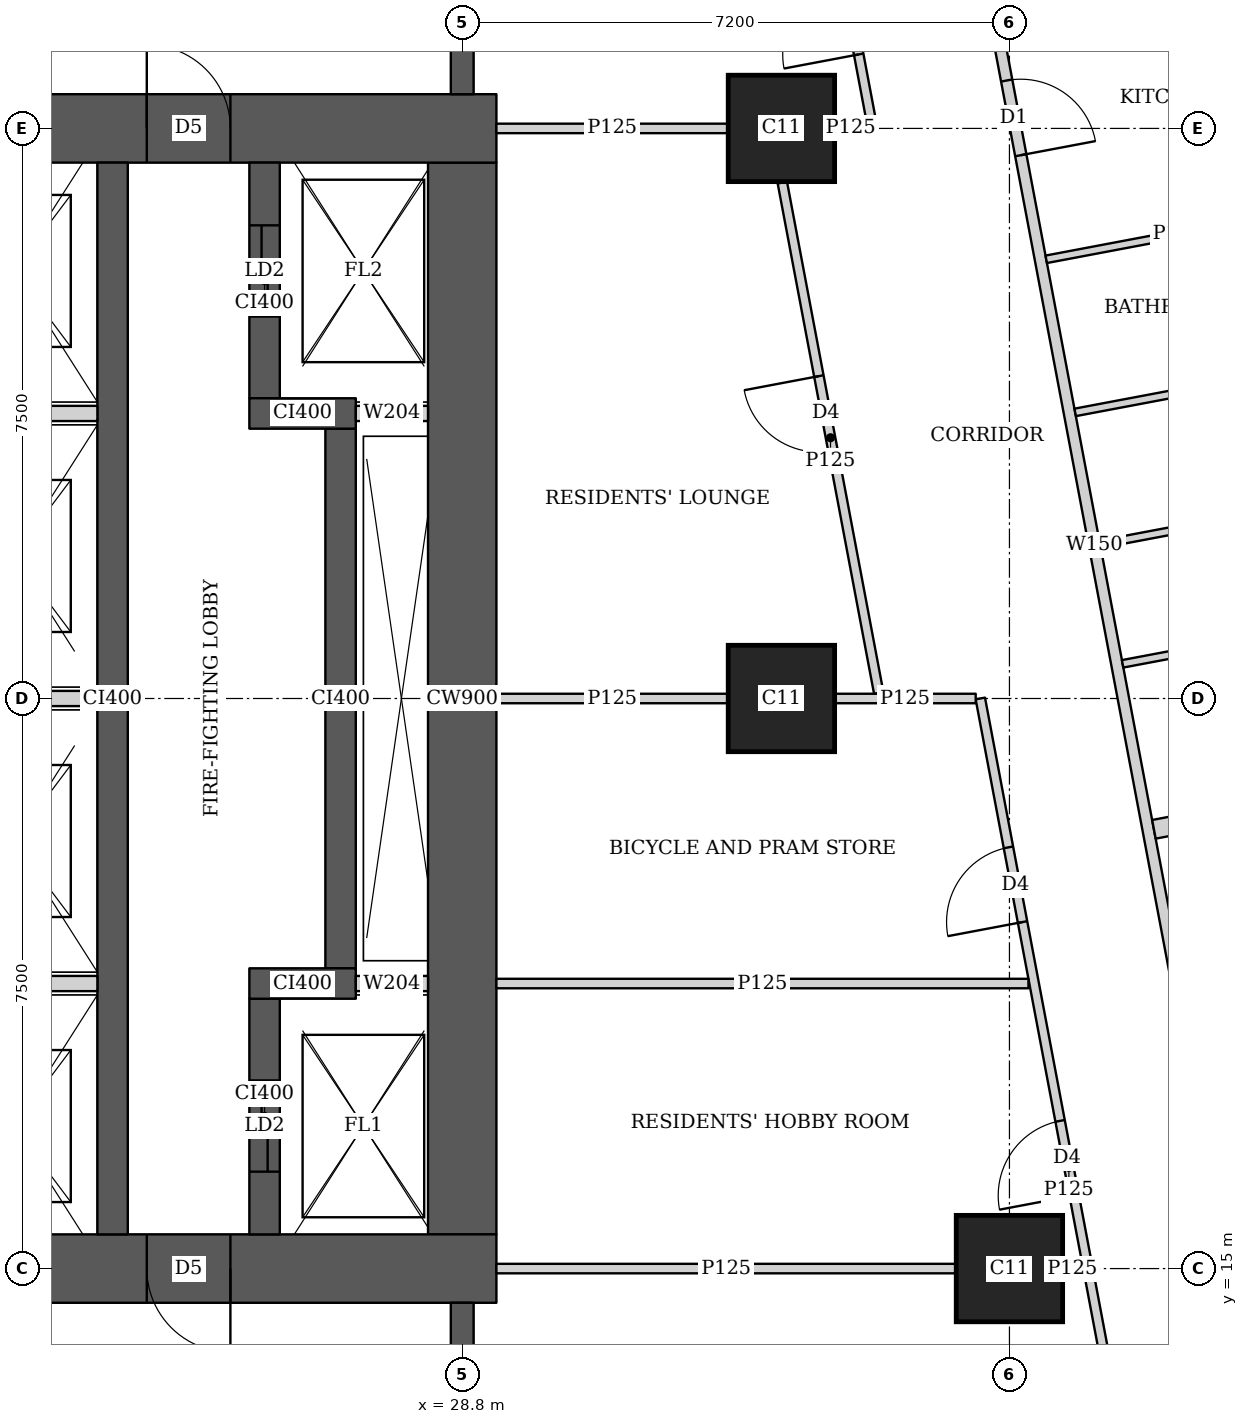
"""IFC4 building model, lengths in metres.
Left out: names, types, materials, properties, quantities, classifications, styles, units other than length and angle.
Written with IfcOpenShell. Run it as: python <this file> out.ifc"""

import sys

from ifc_helpers import new_model, si_unit, direction, frame, frame_2d, origin, origin_2d, place, context, subcontext, project, spatial, rectangle, extrude, element, fill, save


model = new_model("IFC4")
c1 = context("Model", 3, precision=1e-05, world=origin(), true_north=direction((0.0, 1.0)))
c2 = subcontext(c1, "Body", "Model", "MODEL_VIEW")
j1 = project(units=[si_unit("LENGTHUNIT", "METRE"), si_unit("PLANEANGLEUNIT", "RADIAN")], contexts=[c1])
p1 = place(None, origin())
s1 = spatial("IfcSite", under=j1, at=p1, CompositionType="ELEMENT")
p2 = place(p1, origin())
s2 = spatial("IfcBuilding", under=s1, at=p2, CompositionType="ELEMENT")
p3 = place(p2, frame((0.0, 0.0, 251.6)))
s3 = spatial("IfcBuildingStorey", under=s2, at=p3, CompositionType="ELEMENT", Elevation=251.6)
for number, where, z_axis, x_axis in (
    (1, (36.0, 15.0, 0.0), (0.0, 0.0, 1.0), (1.0, 0.0, 0.0)),
    (2, (33.0, 22.5, 0.0), (0.0, 0.0, 1.0), (1.0, 0.0, 0.0)),
    (3, (33.0, 30.0, 0.0), (0.0, 0.0, 1.0), (1.0, 0.0, 0.0)),
):
    element("IfcColumn", number, at=place(p3, frame(where, z_axis=z_axis, x_axis=x_axis)), inside=s3, PredefinedType="COLUMN", context=c2, shape_type="SweptSolid", body=[
        extrude(rectangle(XDim=1.4, YDim=1.4, at=origin_2d()), origin(), (0.0, 0.0, 1.0), 3.75),
    ])
p4 = place(p3, frame((13.95, 15.0, 0.0), z_axis=(0.0, 0.0, 1.0), x_axis=(1.0, 0.0, 0.0)))
e4 = element("IfcWall", 4, at=p4, inside=s3, PredefinedType="SHEAR", context=c2, shape_type="SweptSolid", body=[
    extrude(rectangle(XDim=15.3, YDim=0.9, at=frame_2d((7.65, 0.0))), origin(), (0.0, 0.0, 1.0), 3.75),
])
p5 = place(p4, frame((4.45, 0.0, 0.0)))
e5 = element("IfcOpeningElement", 5, at=p5, cuts=e4, PredefinedType="OPENING", context=c2, shape_type="SweptSolid", body=[
    extrude(rectangle(XDim=1.8, YDim=2.1, at=frame_2d((0.9, 1.05))), frame((0.0, 0.46, 0.0), z_axis=(0.0, -1.0, 0.0), x_axis=(1.0, 0.0, 0.0)), (0.0, 0.0, 1.0), 0.92),
])
p6 = place(p4, frame((10.7, 0.0, 0.0)))
e6 = element("IfcOpeningElement", 6, at=p6, cuts=e4, PredefinedType="OPENING", context=c2, shape_type="SweptSolid", body=[
    extrude(rectangle(XDim=1.1, YDim=2.1, at=frame_2d((0.55, 1.05))), frame((0.0, 0.46, 0.0), z_axis=(0.0, -1.0, 0.0), x_axis=(1.0, 0.0, 0.0)), (0.0, 0.0, 1.0), 0.92),
])
p7 = place(p3, frame((13.95, 30.0, 0.0), z_axis=(0.0, 0.0, 1.0), x_axis=(1.0, 0.0, 0.0)))
e7 = element("IfcWall", 7, at=p7, inside=s3, PredefinedType="SHEAR", context=c2, shape_type="SweptSolid", body=[
    extrude(rectangle(XDim=15.3, YDim=0.9, at=frame_2d((7.65, 0.0))), origin(), (0.0, 0.0, 1.0), 3.75),
])
p8 = place(p7, frame((4.45, 0.0, 0.0)))
e8 = element("IfcOpeningElement", 8, at=p8, cuts=e7, PredefinedType="OPENING", context=c2, shape_type="SweptSolid", body=[
    extrude(rectangle(XDim=1.8, YDim=2.1, at=frame_2d((0.9, 1.05))), frame((0.0, 0.46, 0.0), z_axis=(0.0, -1.0, 0.0), x_axis=(1.0, 0.0, 0.0)), (0.0, 0.0, 1.0), 0.92),
])
p9 = place(p7, frame((10.7, 0.0, 0.0)))
e9 = element("IfcOpeningElement", 9, at=p9, cuts=e7, PredefinedType="OPENING", context=c2, shape_type="SweptSolid", body=[
    extrude(rectangle(XDim=1.1, YDim=2.1, at=frame_2d((0.55, 1.05))), frame((0.0, 0.46, 0.0), z_axis=(0.0, -1.0, 0.0), x_axis=(1.0, 0.0, 0.0)), (0.0, 0.0, 1.0), 0.92),
])
p10 = place(p3, frame((28.8, 15.45, 0.0), z_axis=(0.0, 0.0, 1.0), x_axis=(0.0, 1.0, 0.0)))
e10 = element("IfcWall", 10, at=p10, inside=s3, PredefinedType="SHEAR", context=c2, shape_type="SweptSolid", body=[
    extrude(rectangle(XDim=14.1, YDim=0.9, at=frame_2d((7.05, 0.0))), origin(), (0.0, 0.0, 1.0), 3.75),
])
p11 = place(p3, frame((24.2, 15.45, 0.0), z_axis=(0.0, 0.0, 1.0), x_axis=(0.0, 1.0, 0.0)))
e11 = element("IfcWall", 11, at=p11, inside=s3, PredefinedType="SHEAR", context=c2, shape_type="SweptSolid", body=[
    extrude(rectangle(XDim=14.1, YDim=0.4, at=frame_2d((7.05, 0.0))), origin(), (0.0, 0.0, 1.0), 3.75),
])
p12 = place(p3, frame((26.2, 15.45, 0.0), z_axis=(0.0, 0.0, 1.0), x_axis=(0.0, 1.0, 0.0)))
e12 = element("IfcWall", 12, at=p12, inside=s3, PredefinedType="SHEAR", context=c2, shape_type="SweptSolid", body=[
    extrude(rectangle(XDim=3.1, YDim=0.4, at=frame_2d((1.55, 0.0))), origin(), (0.0, 0.0, 1.0), 3.75),
])
p13 = place(p12, frame((0.825, 0.0, 0.0)))
e13 = element("IfcOpeningElement", 13, at=p13, cuts=e12, PredefinedType="OPENING", context=c2, shape_type="SweptSolid", body=[
    extrude(rectangle(XDim=1.2, YDim=2.1, at=frame_2d((0.6, 1.05))), frame((0.0, 0.21, 0.0), z_axis=(0.0, -1.0, 0.0), x_axis=(1.0, 0.0, 0.0)), (0.0, 0.0, 1.0), 0.42),
])
p14 = place(p3, frame((26.0, 18.75, 0.0), z_axis=(0.0, 0.0, 1.0), x_axis=(1.0, 0.0, 0.0)))
e14 = element("IfcWall", 14, at=p14, inside=s3, PredefinedType="SHEAR", context=c2, shape_type="SweptSolid", body=[
    extrude(rectangle(XDim=1.4, YDim=0.4, at=frame_2d((0.7, 0.0))), origin(), (0.0, 0.0, 1.0), 3.75),
])
p15 = place(p3, frame((27.2, 18.95, 0.0), z_axis=(0.0, 0.0, 1.0), x_axis=(0.0, 1.0, 0.0)))
e15 = element("IfcWall", 15, at=p15, inside=s3, PredefinedType="SHEAR", context=c2, shape_type="SweptSolid", body=[
    extrude(rectangle(XDim=7.1, YDim=0.4, at=frame_2d((3.55, 0.0))), origin(), (0.0, 0.0, 1.0), 3.75),
])
p16 = place(p3, frame((26.0, 26.25, 0.0), z_axis=(0.0, 0.0, 1.0), x_axis=(1.0, 0.0, 0.0)))
e16 = element("IfcWall", 16, at=p16, inside=s3, PredefinedType="SHEAR", context=c2, shape_type="SweptSolid", body=[
    extrude(rectangle(XDim=1.4, YDim=0.4, at=frame_2d((0.7, 0.0))), origin(), (0.0, 0.0, 1.0), 3.75),
])
p17 = place(p3, frame((26.2, 26.45, 0.0), z_axis=(0.0, 0.0, 1.0), x_axis=(0.0, 1.0, 0.0)))
e17 = element("IfcWall", 17, at=p17, inside=s3, PredefinedType="SHEAR", context=c2, shape_type="SweptSolid", body=[
    extrude(rectangle(XDim=3.1, YDim=0.4, at=frame_2d((1.55, 0.0))), origin(), (0.0, 0.0, 1.0), 3.75),
])
p18 = place(p17, frame((1.075, 0.0, 0.0)))
e18 = element("IfcOpeningElement", 18, at=p18, cuts=e17, PredefinedType="OPENING", context=c2, shape_type="SweptSolid", body=[
    extrude(rectangle(XDim=1.2, YDim=2.1, at=frame_2d((0.6, 1.05))), frame((0.0, 0.21, 0.0), z_axis=(0.0, -1.0, 0.0), x_axis=(1.0, 0.0, 0.0)), (0.0, 0.0, 1.0), 0.42),
])
for number, where, z_axis, x_axis in (
    (19, (28.8, 10.35, 0.0), (0.0, 0.0, 1.0), (0.0, 1.0, 0.0)),
    (20, (28.8, 30.45, 0.0), (0.0, 0.0, 1.0), (0.0, 1.0, 0.0)),
):
    element("IfcWall", number, at=place(p3, frame(where, z_axis=z_axis, x_axis=x_axis)), inside=s3, PredefinedType="SHEAR", context=c2, shape_type="SweptSolid", body=[
        extrude(rectangle(XDim=4.2, YDim=0.3, at=frame_2d((2.1, 0.0))), origin(), (0.0, 0.0, 1.0), 3.75),
    ])
p19 = place(p3, frame((33.781, 42.186, 0.0), z_axis=(0.0, 0.0, 1.0), x_axis=(0.185593518645, -0.9826266055, 0.0)))
e21 = element("IfcWall", 21, at=p19, inside=s3, PredefinedType="SOLIDWALL", context=c2, shape_type="SweptSolid", body=[
    extrude(rectangle(XDim=35.961, YDim=0.15, at=frame_2d((17.98, 0.0))), origin(), (0.0, 0.0, 1.0), 2.5),
])
p20 = place(p19, frame((7.183, 0.0, 0.0)))
e22 = element("IfcOpeningElement", 22, at=p20, cuts=e21, PredefinedType="OPENING", context=c2, shape_type="SweptSolid", body=[
    extrude(rectangle(XDim=1.0, YDim=2.1, at=frame_2d((0.5, 1.05))), frame((0.0, 0.085, 0.0), z_axis=(0.0, -1.0, 0.0), x_axis=(1.0, 0.0, 0.0)), (0.0, 0.0, 1.0), 0.17),
])
p21 = place(p19, frame((11.76, 0.0, 0.0)))
e23 = element("IfcOpeningElement", 23, at=p21, cuts=e21, PredefinedType="OPENING", context=c2, shape_type="SweptSolid", body=[
    extrude(rectangle(XDim=1.0, YDim=2.1, at=frame_2d((0.5, 1.05))), frame((0.0, 0.085, 0.0), z_axis=(0.0, -1.0, 0.0), x_axis=(1.0, 0.0, 0.0)), (0.0, 0.0, 1.0), 0.17),
])
p22 = place(p19, frame((23.863, 0.0, 0.0)))
e24 = element("IfcOpeningElement", 24, at=p22, cuts=e21, PredefinedType="OPENING", context=c2, shape_type="SweptSolid", body=[
    extrude(rectangle(XDim=1.0, YDim=2.1, at=frame_2d((0.5, 1.05))), frame((0.0, 0.085, 0.0), z_axis=(0.0, -1.0, 0.0), x_axis=(1.0, 0.0, 0.0)), (0.0, 0.0, 1.0), 0.17),
])
p23 = place(p19, frame((30.502, 0.0, 0.0)))
e25 = element("IfcOpeningElement", 25, at=p23, cuts=e21, PredefinedType="OPENING", context=c2, shape_type="SweptSolid", body=[
    extrude(rectangle(XDim=1.0, YDim=2.1, at=frame_2d((0.5, 1.05))), frame((0.0, 0.085, 0.0), z_axis=(0.0, -1.0, 0.0), x_axis=(1.0, 0.0, 0.0)), (0.0, 0.0, 1.0), 0.17),
])
p24 = place(p3, frame((39.948, 28.933, 0.0), z_axis=(0.0, 0.0, 1.0), x_axis=(-0.982588017646, -0.185797706064, 0.0)))
e26 = element("IfcWall", 26, at=p24, inside=s3, PredefinedType="PARTITIONING", context=c2, shape_type="SweptSolid", body=[
    extrude(rectangle(XDim=3.525, YDim=0.1, at=frame_2d((1.763, 0.0))), origin(), (0.0, 0.0, 1.0), 3.5),
])
p25 = place(p3, frame((40.656, 25.183, 0.0), z_axis=(0.0, 0.0, 1.0), x_axis=(-0.982576058723, -0.185860939478, 0.0)))
e27 = element("IfcWall", 27, at=p25, inside=s3, PredefinedType="PARTITIONING", context=c2, shape_type="SweptSolid", body=[
    extrude(rectangle(XDim=3.524, YDim=0.1, at=frame_2d((1.762, 0.0))), origin(), (0.0, 0.0, 1.0), 3.5),
])
p26 = place(p3, frame((40.329, 26.918, 0.0), z_axis=(0.0, 0.0, 1.0), x_axis=(-0.982638553676, -0.185530247748, 0.0)))
e28 = element("IfcWall", 28, at=p26, inside=s3, PredefinedType="PARTITIONING", context=c2, shape_type="SweptSolid", body=[
    extrude(rectangle(XDim=3.525, YDim=0.1, at=frame_2d((1.763, 0.0))), origin(), (0.0, 0.0, 1.0), 3.5),
])
p27 = place(p3, frame((40.954, 23.61, 0.0), z_axis=(0.0, 0.0, 1.0), x_axis=(-0.98264808502, -0.18547975902, 0.0)))
e29 = element("IfcWall", 29, at=p27, inside=s3, PredefinedType="PARTITIONING", context=c2, shape_type="SweptSolid", body=[
    extrude(rectangle(XDim=3.526, YDim=0.1, at=frame_2d((1.763, 0.0))), origin(), (0.0, 0.0, 1.0), 2.5),
])
p28 = place(p3, frame((42.593, 21.665, 0.0), z_axis=(0.0, 0.0, 1.0), x_axis=(-0.982635807605, -0.185544791394, 0.0)))
e30 = element("IfcWall", 30, at=p28, inside=s3, PredefinedType="SOLIDWALL", context=c2, shape_type="SweptSolid", body=[
    extrude(rectangle(XDim=4.775, YDim=0.25, at=frame_2d((2.388, 0.0))), origin(), (0.0, 0.0, 1.0), 2.5),
])
p29 = place(p3, frame((37.947, 10.163, 0.0), z_axis=(0.0, 0.0, 1.0), x_axis=(-0.185589250699, 0.982627411599, 0.0)))
e31 = element("IfcWall", 31, at=p29, inside=s3, PredefinedType="PARTITIONING", context=c2, shape_type="SweptSolid", body=[
    extrude(rectangle(XDim=12.555, YDim=0.125, at=frame_2d((6.277, 0.0))), origin(), (0.0, 0.0, 1.0), 2.5),
])
p30 = place(p29, frame((0.708, 0.0, 0.0)))
e32 = element("IfcOpeningElement", 32, at=p30, cuts=e31, PredefinedType="OPENING", context=c2, shape_type="SweptSolid", body=[
    extrude(rectangle(XDim=1.0, YDim=2.1, at=frame_2d((0.5, 1.05))), frame((0.0, 0.073, 0.0), z_axis=(0.0, -1.0, 0.0), x_axis=(1.0, 0.0, 0.0)), (0.0, 0.0, 1.0), 0.145),
])
p31 = place(p29, frame((5.9, 0.0, 0.0)))
e33 = element("IfcOpeningElement", 33, at=p31, cuts=e31, PredefinedType="OPENING", context=c2, shape_type="SweptSolid", body=[
    extrude(rectangle(XDim=1.0, YDim=2.1, at=frame_2d((0.5, 1.05))), frame((0.0, 0.073, 0.0), z_axis=(0.0, -1.0, 0.0), x_axis=(1.0, 0.0, 0.0)), (0.0, 0.0, 1.0), 0.145),
])
p32 = place(p29, frame((9.562, 0.0, 0.0)))
e34 = element("IfcOpeningElement", 34, at=p32, cuts=e31, PredefinedType="OPENING", context=c2, shape_type="SweptSolid", body=[
    extrude(rectangle(XDim=1.0, YDim=2.1, at=frame_2d((0.5, 1.05))), frame((0.0, 0.073, 0.0), z_axis=(0.0, -1.0, 0.0), x_axis=(1.0, 0.0, 0.0)), (0.0, 0.0, 1.0), 0.145),
])
p33 = place(p3, frame((34.193, 30.04, 0.0), z_axis=(0.0, 0.0, 1.0), x_axis=(-0.185556349615, 0.98263362507, 0.0)))
e35 = element("IfcWall", 35, at=p33, inside=s3, PredefinedType="PARTITIONING", context=c2, shape_type="SweptSolid", body=[
    extrude(rectangle(XDim=4.883, YDim=0.125, at=frame_2d((2.441, 0.0))), origin(), (0.0, 0.0, 1.0), 2.5),
])
p34 = place(p33, frame((0.95, 0.0, 0.0)))
e36 = element("IfcOpeningElement", 36, at=p34, cuts=e35, PredefinedType="OPENING", context=c2, shape_type="SweptSolid", body=[
    extrude(rectangle(XDim=1.0, YDim=2.1, at=frame_2d((0.5, 1.05))), frame((0.0, 0.073, 0.0), z_axis=(0.0, -1.0, 0.0), x_axis=(1.0, 0.0, 0.0)), (0.0, 0.0, 1.0), 0.145),
])
p35 = place(p3, frame((34.28, 22.574, 0.0), z_axis=(0.0, 0.0, 1.0), x_axis=(-0.185610991981, 0.982623305064, 0.0)))
e37 = element("IfcWall", 37, at=p35, inside=s3, PredefinedType="PARTITIONING", context=c2, shape_type="SweptSolid", body=[
    extrude(rectangle(XDim=6.832, YDim=0.125, at=frame_2d((3.416, 0.0))), origin(), (0.0, 0.0, 1.0), 2.5),
])
p36 = place(p35, frame((3.241, 0.0, 0.0)))
e38 = element("IfcOpeningElement", 38, at=p36, cuts=e37, PredefinedType="OPENING", context=c2, shape_type="SweptSolid", body=[
    extrude(rectangle(XDim=1.0, YDim=2.1, at=frame_2d((0.5, 1.05))), frame((0.0, 0.073, 0.0), z_axis=(0.0, -1.0, 0.0), x_axis=(1.0, 0.0, 0.0)), (0.0, 0.0, 1.0), 0.145),
])
p37 = place(p3, frame((29.25, 15.0, 0.0), z_axis=(0.0, 0.0, 1.0), x_axis=(1.0, 0.0, 0.0)))
e39 = element("IfcWall", 39, at=p37, inside=s3, PredefinedType="PARTITIONING", context=c2, shape_type="SweptSolid", body=[
    extrude(rectangle(XDim=6.049, YDim=0.125, at=frame_2d((3.024, 0.0))), origin(), (0.0, 0.0, 1.0), 3.5),
])
p38 = place(p3, frame((36.701, 15.0, 0.0), z_axis=(0.0, 0.0, 1.0), x_axis=(1.0, 0.0, 0.0)))
e40 = element("IfcWall", 40, at=p38, inside=s3, PredefinedType="PARTITIONING", context=c2, shape_type="SweptSolid", body=[
    extrude(rectangle(XDim=0.257, YDim=0.125, at=frame_2d((0.128, 0.0))), origin(), (0.0, 0.0, 1.0), 3.5),
])
p39 = place(p3, frame((29.25, 18.75, 0.0), z_axis=(0.0, 0.0, 1.0), x_axis=(1.0, 0.0, 0.0)))
e41 = element("IfcWall", 41, at=p39, inside=s3, PredefinedType="PARTITIONING", context=c2, shape_type="SweptSolid", body=[
    extrude(rectangle(XDim=7.0, YDim=0.125, at=frame_2d((3.5, 0.0))), origin(), (0.0, 0.0, 1.0), 3.5),
])
p40 = place(p3, frame((29.25, 22.5, 0.0), z_axis=(0.0, 0.0, 1.0), x_axis=(1.0, 0.0, 0.0)))
e42 = element("IfcWall", 42, at=p40, inside=s3, PredefinedType="PARTITIONING", context=c2, shape_type="SweptSolid", body=[
    extrude(rectangle(XDim=3.049, YDim=0.125, at=frame_2d((1.524, 0.0))), origin(), (0.0, 0.0, 1.0), 3.5),
])
p41 = place(p3, frame((33.701, 22.5, 0.0), z_axis=(0.0, 0.0, 1.0), x_axis=(1.0, 0.0, 0.0)))
e43 = element("IfcWall", 43, at=p41, inside=s3, PredefinedType="PARTITIONING", context=c2, shape_type="SweptSolid", body=[
    extrude(rectangle(XDim=1.855, YDim=0.125, at=frame_2d((0.927, 0.0))), origin(), (0.0, 0.0, 1.0), 2.5),
])
p42 = place(p3, frame((29.25, 30.0, 0.0), z_axis=(0.0, 0.0, 1.0), x_axis=(1.0, 0.0, 0.0)))
e44 = element("IfcWall", 44, at=p42, inside=s3, PredefinedType="PARTITIONING", context=c2, shape_type="SweptSolid", body=[
    extrude(rectangle(XDim=3.049, YDim=0.125, at=frame_2d((1.524, 0.0))), origin(), (0.0, 0.0, 1.0), 3.5),
])
p43 = place(p3, frame((33.701, 30.0, 0.0), z_axis=(0.0, 0.0, 1.0), x_axis=(1.0, 0.0, 0.0)))
e45 = element("IfcWall", 45, at=p43, inside=s3, PredefinedType="PARTITIONING", context=c2, shape_type="SweptSolid", body=[
    extrude(rectangle(XDim=0.424, YDim=0.125, at=frame_2d((0.212, 0.0))), origin(), (0.0, 0.0, 1.0), 2.5),
])
for number, where, z_axis, x_axis in (
    (46, (21.8, 18.75, 0.0), (0.0, 0.0, 1.0), (1.0, 0.0, 0.0)),
    (47, (21.8, 22.5, 0.0), (0.0, 0.0, 1.0), (1.0, 0.0, 0.0)),
    (48, (21.8, 26.25, 0.0), (0.0, 0.0, 1.0), (1.0, 0.0, 0.0)),
):
    element("IfcWall", number, at=place(p3, frame(where, z_axis=z_axis, x_axis=x_axis)), inside=s3, PredefinedType="SOLIDWALL", context=c2, shape_type="SweptSolid", body=[
        extrude(rectangle(XDim=2.2, YDim=0.2, at=frame_2d((1.1, 0.0))), origin(), (0.0, 0.0, 1.0), 3.5),
    ])
for number, where, z_axis, x_axis in (
    (49, (27.4, 18.75, 0.0), (0.0, 0.0, 1.0), (1.0, 0.0, 0.0)),
    (50, (27.4, 26.25, 0.0), (0.0, 0.0, 1.0), (1.0, 0.0, 0.0)),
):
    element("IfcWall", number, at=place(p3, frame(where, z_axis=z_axis, x_axis=x_axis)), inside=s3, PredefinedType="SOLIDWALL", context=c2, shape_type="SweptSolid", body=[
        extrude(rectangle(XDim=0.95, YDim=0.2, at=frame_2d((0.475, 0.0))), origin(), (0.0, 0.0, 1.0), 3.5),
    ])
p44 = place(p21, origin())
e51 = element("IfcDoor", 51, at=p44, inside=s3, OperationType="SINGLE_SWING_RIGHT", PredefinedType="DOOR", context=c2, shape_type="SweptSolid", body=[
    extrude(rectangle(XDim=1.0, YDim=2.1, at=frame_2d((0.5, 1.05))), frame((0.0, 0.025, 0.0), z_axis=(0.0, -1.0, 0.0), x_axis=(1.0, 0.0, 0.0)), (0.0, 0.0, 1.0), 0.05),
])
fill(e23, e51)
p45 = place(p31, origin())
e52 = element("IfcDoor", 52, at=p45, inside=s3, OperationType="SINGLE_SWING_LEFT", PredefinedType="DOOR", context=c2, shape_type="SweptSolid", body=[
    extrude(rectangle(XDim=1.0, YDim=2.1, at=frame_2d((0.5, 1.05))), frame((0.0, 0.025, 0.0), z_axis=(0.0, -1.0, 0.0), x_axis=(1.0, 0.0, 0.0)), (0.0, 0.0, 1.0), 0.05),
])
fill(e33, e52)
p46 = place(p32, origin())
e53 = element("IfcDoor", 53, at=p46, inside=s3, OperationType="SINGLE_SWING_LEFT", PredefinedType="DOOR", context=c2, shape_type="SweptSolid", body=[
    extrude(rectangle(XDim=1.0, YDim=2.1, at=frame_2d((0.5, 1.05))), frame((0.0, 0.025, 0.0), z_axis=(0.0, -1.0, 0.0), x_axis=(1.0, 0.0, 0.0)), (0.0, 0.0, 1.0), 0.05),
])
fill(e34, e53)
p47 = place(p36, origin())
e54 = element("IfcDoor", 54, at=p47, inside=s3, OperationType="SINGLE_SWING_RIGHT", PredefinedType="DOOR", context=c2, shape_type="SweptSolid", body=[
    extrude(rectangle(XDim=1.0, YDim=2.1, at=frame_2d((0.5, 1.05))), frame((0.0, 0.025, 0.0), z_axis=(0.0, -1.0, 0.0), x_axis=(1.0, 0.0, 0.0)), (0.0, 0.0, 1.0), 0.05),
])
fill(e38, e54)
p48 = place(p34, origin())
e55 = element("IfcDoor", 55, at=p48, inside=s3, OperationType="SINGLE_SWING_LEFT", PredefinedType="DOOR", context=c2, shape_type="SweptSolid", body=[
    extrude(rectangle(XDim=1.0, YDim=2.1, at=frame_2d((0.5, 1.05))), frame((0.0, 0.025, 0.0), z_axis=(0.0, -1.0, 0.0), x_axis=(1.0, 0.0, 0.0)), (0.0, 0.0, 1.0), 0.05),
])
fill(e36, e55)
p49 = place(p6, origin())
e56 = element("IfcDoor", 56, at=p49, inside=s3, OperationType="SINGLE_SWING_LEFT", PredefinedType="DOOR", context=c2, shape_type="SweptSolid", body=[
    extrude(rectangle(XDim=1.1, YDim=2.1, at=frame_2d((0.55, 1.05))), frame((0.0, 0.025, 0.0), z_axis=(0.0, -1.0, 0.0), x_axis=(1.0, 0.0, 0.0)), (0.0, 0.0, 1.0), 0.05),
])
fill(e6, e56)
p50 = place(p9, origin())
e57 = element("IfcDoor", 57, at=p50, inside=s3, OperationType="SINGLE_SWING_LEFT", PredefinedType="DOOR", context=c2, shape_type="SweptSolid", body=[
    extrude(rectangle(XDim=1.1, YDim=2.1, at=frame_2d((0.55, 1.05))), frame((0.0, 0.025, 0.0), z_axis=(0.0, -1.0, 0.0), x_axis=(1.0, 0.0, 0.0)), (0.0, 0.0, 1.0), 0.05),
])
fill(e9, e57)
p51 = place(p13, origin())
e58 = element("IfcDoor", 58, at=p51, inside=s3, OperationType="DOUBLE_DOOR_SLIDING", PredefinedType="DOOR", context=c2, shape_type="SweptSolid", body=[
    extrude(rectangle(XDim=1.2, YDim=2.1, at=frame_2d((0.6, 1.05))), frame((0.0, 0.025, 0.0), z_axis=(0.0, -1.0, 0.0), x_axis=(1.0, 0.0, 0.0)), (0.0, 0.0, 1.0), 0.05),
])
fill(e13, e58)
p52 = place(p18, origin())
e59 = element("IfcDoor", 59, at=p52, inside=s3, OperationType="DOUBLE_DOOR_SLIDING", PredefinedType="DOOR", context=c2, shape_type="SweptSolid", body=[
    extrude(rectangle(XDim=1.2, YDim=2.1, at=frame_2d((0.6, 1.05))), frame((0.0, 0.025, 0.0), z_axis=(0.0, -1.0, 0.0), x_axis=(1.0, 0.0, 0.0)), (0.0, 0.0, 1.0), 0.05),
])
fill(e18, e59)
save(model, sys.argv[1])
